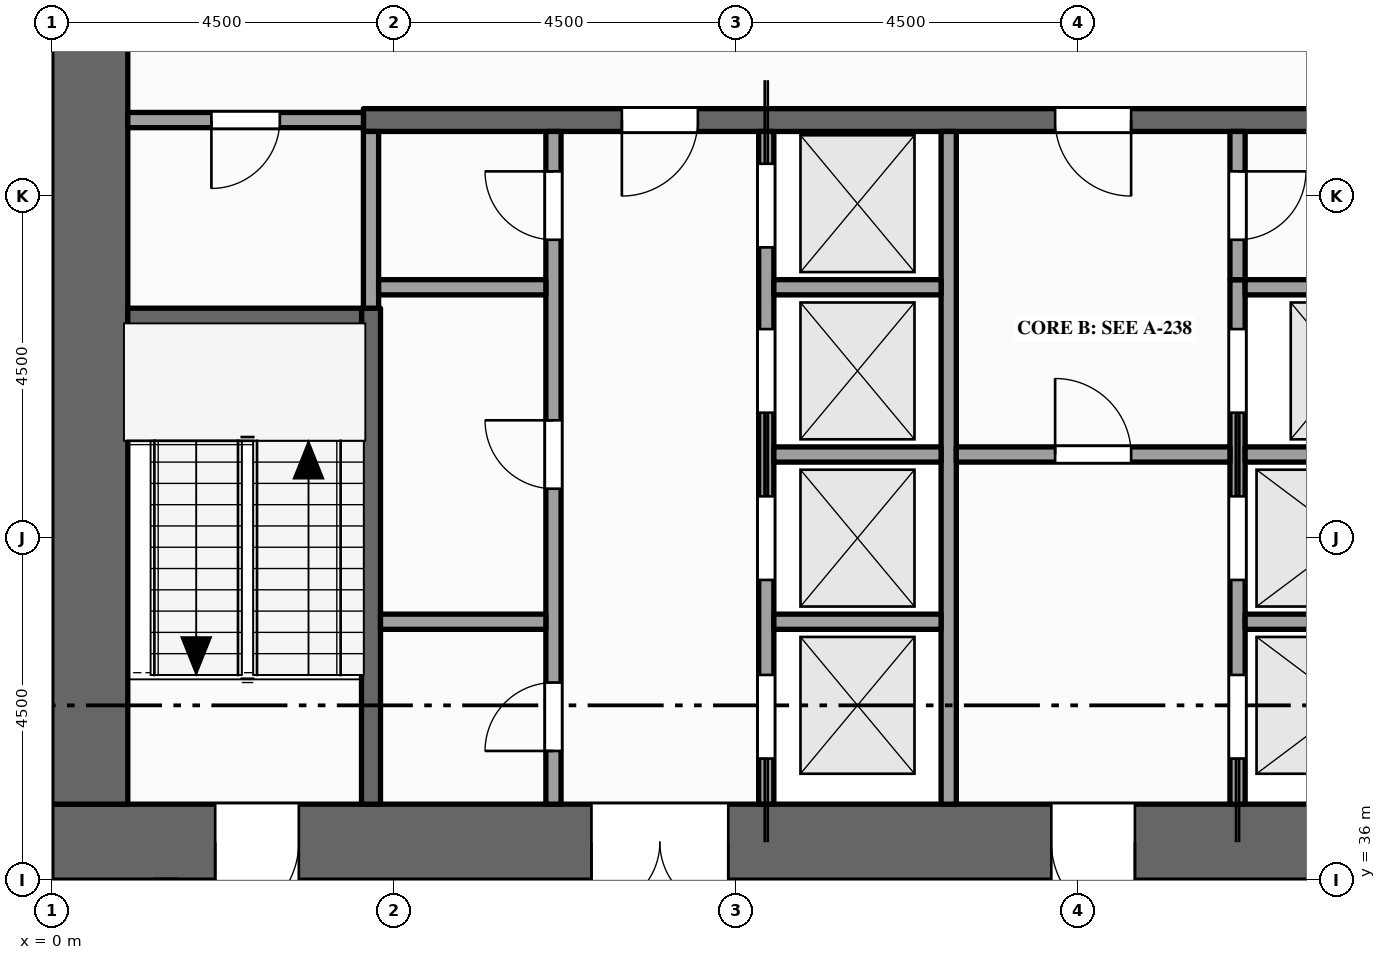
"""IFC4 building model, lengths in metres.
Left out: names, types, materials, properties, quantities, classifications, styles, units other than length and angle.
Written with IfcOpenShell. Run it as: python <this file> out.ifc"""

import sys

from ifc_helpers import new_model, si_unit, direction, frame, frame_2d, origin, place, context, subcontext, project, spatial, rectangle, extrude, element, fill, save


model = new_model("IFC4")
c1 = context("Model", 3, precision=1e-05, world=origin(), true_north=direction((0.0, 1.0)))
c2 = subcontext(c1, "Body", "Model", "MODEL_VIEW")
j1 = project(units=[si_unit("LENGTHUNIT", "METRE"), si_unit("PLANEANGLEUNIT", "RADIAN")], contexts=[c1])
p1 = place(None, origin())
s1 = spatial("IfcSite", under=j1, at=p1, CompositionType="ELEMENT")
p2 = place(p1, origin())
s2 = spatial("IfcBuilding", under=s1, at=p2, CompositionType="ELEMENT")
p3 = place(p2, frame((0.0, 0.0, 211.0)))
s3 = spatial("IfcBuildingStorey", under=s2, at=p3, CompositionType="ELEMENT", Elevation=211.0)
p4 = place(p3, frame((0.0, 36.5, -0.15), z_axis=(0.0, 0.0, 1.0), x_axis=(1.0, 0.0, 0.0)))
e1 = element("IfcWall", 1, at=p4, inside=s3, PredefinedType="SHEAR", context=c2, shape_type="SweptSolid", body=[
    extrude(rectangle(XDim=22.5, YDim=1.0, at=frame_2d((11.25, 0.0))), origin(), (0.0, 0.0, 1.0), 4.0),
])
p5 = place(p4, frame((7.1, 0.0, 0.15)))
e2 = element("IfcOpeningElement", 2, at=p5, cuts=e1, PredefinedType="OPENING", context=c2, shape_type="SweptSolid", body=[
    extrude(rectangle(XDim=1.8, YDim=2.1, at=frame_2d((0.9, 1.05))), frame((0.0, 0.51, 0.0), z_axis=(0.0, -1.0, 0.0), x_axis=(1.0, 0.0, 0.0)), (0.0, 0.0, 1.0), 1.02),
])
p6 = place(p4, frame((13.15, 0.0, 0.15)))
e3 = element("IfcOpeningElement", 3, at=p6, cuts=e1, PredefinedType="OPENING", context=c2, shape_type="SweptSolid", body=[
    extrude(rectangle(XDim=1.1, YDim=2.1, at=frame_2d((0.55, 1.05))), frame((0.0, 0.51, 0.0), z_axis=(0.0, -1.0, 0.0), x_axis=(1.0, 0.0, 0.0)), (0.0, 0.0, 1.0), 1.02),
])
p7 = place(p4, frame((2.15, 0.0, 0.15)))
e4 = element("IfcOpeningElement", 4, at=p7, cuts=e1, PredefinedType="OPENING", context=c2, shape_type="SweptSolid", body=[
    extrude(rectangle(XDim=1.1, YDim=2.1, at=frame_2d((0.55, 1.05))), frame((0.0, 0.51, 0.0), z_axis=(0.0, -1.0, 0.0), x_axis=(1.0, 0.0, 0.0)), (0.0, 0.0, 1.0), 1.02),
])
p8 = place(p4, frame((19.35, 0.0, 0.15)))
e5 = element("IfcOpeningElement", 5, at=p8, cuts=e1, PredefinedType="OPENING", context=c2, shape_type="SweptSolid", body=[
    extrude(rectangle(XDim=1.1, YDim=2.1, at=frame_2d((0.55, 1.05))), frame((0.0, 0.51, 0.0), z_axis=(0.0, -1.0, 0.0), x_axis=(1.0, 0.0, 0.0)), (0.0, 0.0, 1.0), 1.02),
])
p9 = place(p3, frame((0.5, 37.0, -0.15), z_axis=(0.0, 0.0, 1.0), x_axis=(0.0, 1.0, 0.0)))
e6 = element("IfcWall", 6, at=p9, inside=s3, PredefinedType="SHEAR", context=c2, shape_type="SweptSolid", body=[
    extrude(rectangle(XDim=11.5, YDim=1.0, at=frame_2d((5.75, 0.0))), origin(), (0.0, 0.0, 1.0), 4.0),
])
p10 = place(p3, frame((4.2, 37.0, 0.0), z_axis=(0.0, 0.0, 1.0), x_axis=(0.0, 1.0, 0.0)))
e7 = element("IfcWall", 7, at=p10, inside=s3, PredefinedType="SHEAR", context=c2, shape_type="SweptSolid", body=[
    extrude(rectangle(XDim=6.525, YDim=0.25, at=frame_2d((3.262, 0.0))), origin(), (0.0, 0.0, 1.0), 3.85),
])
p11 = place(p3, frame((4.2, 43.525, 0.0), z_axis=(0.0, 0.0, 1.0), x_axis=(0.0, 1.0, 0.0)))
e8 = element("IfcWall", 8, at=p11, inside=s3, PredefinedType="PARTITIONING", context=c2, shape_type="SweptSolid", body=[
    extrude(rectangle(XDim=2.325, YDim=0.2, at=frame_2d((1.163, 0.0))), origin(), (0.0, 0.0, 1.0), 3.85),
])
p12 = place(p3, frame((6.6, 37.0, 0.0), z_axis=(0.0, 0.0, 1.0), x_axis=(0.0, 1.0, 0.0)))
e9 = element("IfcWall", 9, at=p12, inside=s3, PredefinedType="PARTITIONING", context=c2, shape_type="SweptSolid", body=[
    extrude(rectangle(XDim=8.85, YDim=0.2, at=frame_2d((4.425, 0.0))), origin(), (0.0, 0.0, 1.0), 3.85),
])
p13 = place(p12, frame((0.7, 0.0, 0.0)))
e10 = element("IfcOpeningElement", 10, at=p13, cuts=e9, PredefinedType="OPENING", context=c2, shape_type="SweptSolid", body=[
    extrude(rectangle(XDim=0.9, YDim=2.1, at=frame_2d((0.45, 1.05))), frame((0.0, 0.11, 0.0), z_axis=(0.0, -1.0, 0.0), x_axis=(1.0, 0.0, 0.0)), (0.0, 0.0, 1.0), 0.22),
])
p14 = place(p12, frame((4.15, 0.0, 0.0)))
e11 = element("IfcOpeningElement", 11, at=p14, cuts=e9, PredefinedType="OPENING", context=c2, shape_type="SweptSolid", body=[
    extrude(rectangle(XDim=0.9, YDim=2.1, at=frame_2d((0.45, 1.05))), frame((0.0, 0.11, 0.0), z_axis=(0.0, -1.0, 0.0), x_axis=(1.0, 0.0, 0.0)), (0.0, 0.0, 1.0), 0.22),
])
p15 = place(p12, frame((7.425, 0.0, 0.0)))
e12 = element("IfcOpeningElement", 12, at=p15, cuts=e9, PredefinedType="OPENING", context=c2, shape_type="SweptSolid", body=[
    extrude(rectangle(XDim=0.9, YDim=2.1, at=frame_2d((0.45, 1.05))), frame((0.0, 0.11, 0.0), z_axis=(0.0, -1.0, 0.0), x_axis=(1.0, 0.0, 0.0)), (0.0, 0.0, 1.0), 0.22),
])
p16 = place(p3, frame((9.4, 37.0, 0.0), z_axis=(0.0, 0.0, 1.0), x_axis=(0.0, 1.0, 0.0)))
e13 = element("IfcWall", 13, at=p16, inside=s3, PredefinedType="SOLIDWALL", context=c2, shape_type="SweptSolid", body=[
    extrude(rectangle(XDim=8.85, YDim=0.2, at=frame_2d((4.425, 0.0))), origin(), (0.0, 0.0, 1.0), 3.85),
])
p17 = place(p16, frame((0.6, 0.0, 0.012)))
e14 = element("IfcOpeningElement", 14, at=p17, cuts=e13, PredefinedType="OPENING", context=c2, shape_type="SweptSolid", body=[
    extrude(rectangle(XDim=1.1, YDim=2.1, at=frame_2d((0.55, 1.05))), frame((0.0, 0.11, 0.0), z_axis=(0.0, -1.0, 0.0), x_axis=(1.0, 0.0, 0.0)), (0.0, 0.0, 1.0), 0.22),
])
p18 = place(p16, frame((2.95, 0.0, 0.012)))
e15 = element("IfcOpeningElement", 15, at=p18, cuts=e13, PredefinedType="OPENING", context=c2, shape_type="SweptSolid", body=[
    extrude(rectangle(XDim=1.1, YDim=2.1, at=frame_2d((0.55, 1.05))), frame((0.0, 0.11, 0.0), z_axis=(0.0, -1.0, 0.0), x_axis=(1.0, 0.0, 0.0)), (0.0, 0.0, 1.0), 0.22),
])
p19 = place(p16, frame((5.15, 0.0, 0.012)))
e16 = element("IfcOpeningElement", 16, at=p19, cuts=e13, PredefinedType="OPENING", context=c2, shape_type="SweptSolid", body=[
    extrude(rectangle(XDim=1.1, YDim=2.1, at=frame_2d((0.55, 1.05))), frame((0.0, 0.11, 0.0), z_axis=(0.0, -1.0, 0.0), x_axis=(1.0, 0.0, 0.0)), (0.0, 0.0, 1.0), 0.22),
])
p20 = place(p16, frame((7.325, 0.0, 0.012)))
e17 = element("IfcOpeningElement", 17, at=p20, cuts=e13, PredefinedType="OPENING", context=c2, shape_type="SweptSolid", body=[
    extrude(rectangle(XDim=1.1, YDim=2.1, at=frame_2d((0.55, 1.05))), frame((0.0, 0.11, 0.0), z_axis=(0.0, -1.0, 0.0), x_axis=(1.0, 0.0, 0.0)), (0.0, 0.0, 1.0), 0.22),
])
p21 = place(p3, frame((11.8, 37.0, 0.0), z_axis=(0.0, 0.0, 1.0), x_axis=(0.0, 1.0, 0.0)))
e18 = element("IfcWall", 18, at=p21, inside=s3, PredefinedType="SOLIDWALL", context=c2, shape_type="SweptSolid", body=[
    extrude(rectangle(XDim=8.85, YDim=0.2, at=frame_2d((4.425, 0.0))), origin(), (0.0, 0.0, 1.0), 3.85),
])
p22 = place(p3, frame((15.6, 37.0, 0.0), z_axis=(0.0, 0.0, 1.0), x_axis=(0.0, 1.0, 0.0)))
e19 = element("IfcWall", 19, at=p22, inside=s3, PredefinedType="SOLIDWALL", context=c2, shape_type="SweptSolid", body=[
    extrude(rectangle(XDim=6.9, YDim=0.2, at=frame_2d((3.45, 0.0))), origin(), (0.0, 0.0, 1.0), 3.85),
])
p23 = place(p22, frame((0.6, 0.0, 0.012)))
e20 = element("IfcOpeningElement", 20, at=p23, cuts=e19, PredefinedType="OPENING", context=c2, shape_type="SweptSolid", body=[
    extrude(rectangle(XDim=1.1, YDim=2.1, at=frame_2d((0.55, 1.05))), frame((0.0, 0.11, 0.0), z_axis=(0.0, -1.0, 0.0), x_axis=(1.0, 0.0, 0.0)), (0.0, 0.0, 1.0), 0.22),
])
p24 = place(p22, frame((2.95, 0.0, 0.012)))
e21 = element("IfcOpeningElement", 21, at=p24, cuts=e19, PredefinedType="OPENING", context=c2, shape_type="SweptSolid", body=[
    extrude(rectangle(XDim=1.1, YDim=2.1, at=frame_2d((0.55, 1.05))), frame((0.0, 0.11, 0.0), z_axis=(0.0, -1.0, 0.0), x_axis=(1.0, 0.0, 0.0)), (0.0, 0.0, 1.0), 0.22),
])
p25 = place(p22, frame((5.15, 0.0, 0.012)))
e22 = element("IfcOpeningElement", 22, at=p25, cuts=e19, PredefinedType="OPENING", context=c2, shape_type="SweptSolid", body=[
    extrude(rectangle(XDim=1.1, YDim=2.1, at=frame_2d((0.55, 1.05))), frame((0.0, 0.11, 0.0), z_axis=(0.0, -1.0, 0.0), x_axis=(1.0, 0.0, 0.0)), (0.0, 0.0, 1.0), 0.22),
])
p26 = place(p3, frame((15.6, 43.9, 0.0), z_axis=(0.0, 0.0, 1.0), x_axis=(0.0, 1.0, 0.0)))
e23 = element("IfcWall", 23, at=p26, inside=s3, PredefinedType="PARTITIONING", context=c2, shape_type="SweptSolid", body=[
    extrude(rectangle(XDim=1.95, YDim=0.2, at=frame_2d((0.975, 0.0))), origin(), (0.0, 0.0, 1.0), 3.85),
])
p27 = place(p26, frame((0.525, 0.0, 0.0)))
e24 = element("IfcOpeningElement", 24, at=p27, cuts=e23, PredefinedType="OPENING", context=c2, shape_type="SweptSolid", body=[
    extrude(rectangle(XDim=0.9, YDim=2.1, at=frame_2d((0.45, 1.05))), frame((0.0, 0.11, 0.0), z_axis=(0.0, -1.0, 0.0), x_axis=(1.0, 0.0, 0.0)), (0.0, 0.0, 1.0), 0.22),
])
p28 = place(p3, frame((4.325, 39.4, 0.0), z_axis=(0.0, 0.0, 1.0), x_axis=(1.0, 0.0, 0.0)))
e25 = element("IfcWall", 25, at=p28, inside=s3, PredefinedType="PARTITIONING", context=c2, shape_type="SweptSolid", body=[
    extrude(rectangle(XDim=2.175, YDim=0.2, at=frame_2d((1.087, 0.0))), origin(), (0.0, 0.0, 1.0), 3.85),
])
p29 = place(p3, frame((9.5, 39.4, 0.0), z_axis=(0.0, 0.0, 1.0), x_axis=(1.0, 0.0, 0.0)))
e26 = element("IfcWall", 26, at=p29, inside=s3, PredefinedType="SOLIDWALL", context=c2, shape_type="SweptSolid", body=[
    extrude(rectangle(XDim=2.2, YDim=0.2, at=frame_2d((1.1, 0.0))), origin(), (0.0, 0.0, 1.0), 3.85),
])
p30 = place(p3, frame((15.7, 39.4, 0.0), z_axis=(0.0, 0.0, 1.0), x_axis=(1.0, 0.0, 0.0)))
e27 = element("IfcWall", 27, at=p30, inside=s3, PredefinedType="SOLIDWALL", context=c2, shape_type="SweptSolid", body=[
    extrude(rectangle(XDim=2.675, YDim=0.2, at=frame_2d((1.337, 0.0))), origin(), (0.0, 0.0, 1.0), 3.85),
])
p31 = place(p3, frame((9.5, 41.6, 0.0), z_axis=(0.0, 0.0, 1.0), x_axis=(1.0, 0.0, 0.0)))
e28 = element("IfcWall", 28, at=p31, inside=s3, PredefinedType="SOLIDWALL", context=c2, shape_type="SweptSolid", body=[
    extrude(rectangle(XDim=2.2, YDim=0.2, at=frame_2d((1.1, 0.0))), origin(), (0.0, 0.0, 1.0), 3.85),
])
p32 = place(p3, frame((11.9, 41.6, 0.0), z_axis=(0.0, 0.0, 1.0), x_axis=(1.0, 0.0, 0.0)))
e29 = element("IfcWall", 29, at=p32, inside=s3, PredefinedType="PARTITIONING", context=c2, shape_type="SweptSolid", body=[
    extrude(rectangle(XDim=3.6, YDim=0.2, at=frame_2d((1.8, 0.0))), origin(), (0.0, 0.0, 1.0), 3.85),
])
p33 = place(p32, frame((1.3, 0.0, 0.0)))
e30 = element("IfcOpeningElement", 30, at=p33, cuts=e29, PredefinedType="OPENING", context=c2, shape_type="SweptSolid", body=[
    extrude(rectangle(XDim=1.0, YDim=2.1, at=frame_2d((0.5, 1.05))), frame((0.0, 0.11, 0.0), z_axis=(0.0, -1.0, 0.0), x_axis=(1.0, 0.0, 0.0)), (0.0, 0.0, 1.0), 0.22),
])
p34 = place(p3, frame((15.7, 41.6, 0.0), z_axis=(0.0, 0.0, 1.0), x_axis=(1.0, 0.0, 0.0)))
e31 = element("IfcWall", 31, at=p34, inside=s3, PredefinedType="SOLIDWALL", context=c2, shape_type="SweptSolid", body=[
    extrude(rectangle(XDim=2.675, YDim=0.2, at=frame_2d((1.337, 0.0))), origin(), (0.0, 0.0, 1.0), 3.85),
])
p35 = place(p3, frame((1.0, 43.4, 0.0), z_axis=(0.0, 0.0, 1.0), x_axis=(1.0, 0.0, 0.0)))
e32 = element("IfcWall", 32, at=p35, inside=s3, PredefinedType="SHEAR", context=c2, shape_type="SweptSolid", body=[
    extrude(rectangle(XDim=3.075, YDim=0.25, at=frame_2d((1.538, 0.0))), origin(), (0.0, 0.0, 1.0), 3.85),
])
p36 = place(p3, frame((4.3, 43.8, 0.0), z_axis=(0.0, 0.0, 1.0), x_axis=(1.0, 0.0, 0.0)))
e33 = element("IfcWall", 33, at=p36, inside=s3, PredefinedType="PARTITIONING", context=c2, shape_type="SweptSolid", body=[
    extrude(rectangle(XDim=2.2, YDim=0.2, at=frame_2d((1.1, 0.0))), origin(), (0.0, 0.0, 1.0), 3.85),
])
p37 = place(p3, frame((9.5, 43.8, 0.0), z_axis=(0.0, 0.0, 1.0), x_axis=(1.0, 0.0, 0.0)))
e34 = element("IfcWall", 34, at=p37, inside=s3, PredefinedType="SOLIDWALL", context=c2, shape_type="SweptSolid", body=[
    extrude(rectangle(XDim=2.2, YDim=0.2, at=frame_2d((1.1, 0.0))), origin(), (0.0, 0.0, 1.0), 3.85),
])
p38 = place(p3, frame((15.7, 43.8, 0.0), z_axis=(0.0, 0.0, 1.0), x_axis=(1.0, 0.0, 0.0)))
e35 = element("IfcWall", 35, at=p38, inside=s3, PredefinedType="SOLIDWALL", context=c2, shape_type="SweptSolid", body=[
    extrude(rectangle(XDim=2.7, YDim=0.2, at=frame_2d((1.35, 0.0))), origin(), (0.0, 0.0, 1.0), 3.85),
])
p39 = place(p3, frame((1.0, 46.0, 0.0), z_axis=(0.0, 0.0, 1.0), x_axis=(1.0, 0.0, 0.0)))
e36 = element("IfcWall", 36, at=p39, inside=s3, PredefinedType="PARTITIONING", context=c2, shape_type="SweptSolid", body=[
    extrude(rectangle(XDim=3.1, YDim=0.2, at=frame_2d((1.55, 0.0))), origin(), (0.0, 0.0, 1.0), 3.85),
])
p40 = place(p39, frame((1.1, 0.0, 0.0)))
e37 = element("IfcOpeningElement", 37, at=p40, cuts=e36, PredefinedType="OPENING", context=c2, shape_type="SweptSolid", body=[
    extrude(rectangle(XDim=0.9, YDim=2.1, at=frame_2d((0.45, 1.05))), frame((0.0, 0.11, 0.0), z_axis=(0.0, -1.0, 0.0), x_axis=(1.0, 0.0, 0.0)), (0.0, 0.0, 1.0), 0.22),
])
p41 = place(p3, frame((4.1, 46.0, 0.0), z_axis=(0.0, 0.0, 1.0), x_axis=(1.0, 0.0, 0.0)))
e38 = element("IfcWall", 38, at=p41, inside=s3, PredefinedType="SHEAR", context=c2, shape_type="SweptSolid", body=[
    extrude(rectangle(XDim=14.5, YDim=0.3, at=frame_2d((7.25, 0.0))), origin(), (0.0, 0.0, 1.0), 3.85),
])
p42 = place(p41, frame((3.4, 0.0, 0.0)))
e39 = element("IfcOpeningElement", 39, at=p42, cuts=e38, PredefinedType="OPENING", context=c2, shape_type="SweptSolid", body=[
    extrude(rectangle(XDim=1.0, YDim=2.1, at=frame_2d((0.5, 1.05))), frame((0.0, 0.16, 0.0), z_axis=(0.0, -1.0, 0.0), x_axis=(1.0, 0.0, 0.0)), (0.0, 0.0, 1.0), 0.32),
])
p43 = place(p41, frame((9.1, 0.0, 0.0)))
e40 = element("IfcOpeningElement", 40, at=p43, cuts=e38, PredefinedType="OPENING", context=c2, shape_type="SweptSolid", body=[
    extrude(rectangle(XDim=1.0, YDim=2.1, at=frame_2d((0.5, 1.05))), frame((0.0, 0.16, 0.0), z_axis=(0.0, -1.0, 0.0), x_axis=(1.0, 0.0, 0.0)), (0.0, 0.0, 1.0), 0.32),
])
p44 = place(p17, origin())
e41 = element("IfcDoor", 41, at=p44, inside=s3, OperationType="SLIDING_TO_LEFT", PredefinedType="DOOR", context=c2, shape_type="SweptSolid", body=[
    extrude(rectangle(XDim=1.1, YDim=2.1, at=frame_2d((0.55, 1.05))), frame((0.0, 0.025, 0.0), z_axis=(0.0, -1.0, 0.0), x_axis=(1.0, 0.0, 0.0)), (0.0, 0.0, 1.0), 0.05),
])
fill(e14, e41)
p45 = place(p18, origin())
e42 = element("IfcDoor", 42, at=p45, inside=s3, OperationType="SLIDING_TO_RIGHT", PredefinedType="DOOR", context=c2, shape_type="SweptSolid", body=[
    extrude(rectangle(XDim=1.1, YDim=2.1, at=frame_2d((0.55, 1.05))), frame((0.0, 0.025, 0.0), z_axis=(0.0, -1.0, 0.0), x_axis=(1.0, 0.0, 0.0)), (0.0, 0.0, 1.0), 0.05),
])
fill(e15, e42)
p46 = place(p19, origin())
e43 = element("IfcDoor", 43, at=p46, inside=s3, OperationType="SLIDING_TO_LEFT", PredefinedType="DOOR", context=c2, shape_type="SweptSolid", body=[
    extrude(rectangle(XDim=1.1, YDim=2.1, at=frame_2d((0.55, 1.05))), frame((0.0, 0.025, 0.0), z_axis=(0.0, -1.0, 0.0), x_axis=(1.0, 0.0, 0.0)), (0.0, 0.0, 1.0), 0.05),
])
fill(e16, e43)
p47 = place(p20, origin())
e44 = element("IfcDoor", 44, at=p47, inside=s3, OperationType="SLIDING_TO_RIGHT", PredefinedType="DOOR", context=c2, shape_type="SweptSolid", body=[
    extrude(rectangle(XDim=1.1, YDim=2.1, at=frame_2d((0.55, 1.05))), frame((0.0, 0.025, 0.0), z_axis=(0.0, -1.0, 0.0), x_axis=(1.0, 0.0, 0.0)), (0.0, 0.0, 1.0), 0.05),
])
fill(e17, e44)
p48 = place(p23, origin())
e45 = element("IfcDoor", 45, at=p48, inside=s3, OperationType="SLIDING_TO_LEFT", PredefinedType="DOOR", context=c2, shape_type="SweptSolid", body=[
    extrude(rectangle(XDim=1.1, YDim=2.1, at=frame_2d((0.55, 1.05))), frame((0.0, 0.025, 0.0), z_axis=(0.0, -1.0, 0.0), x_axis=(1.0, 0.0, 0.0)), (0.0, 0.0, 1.0), 0.05),
])
fill(e20, e45)
p49 = place(p24, origin())
e46 = element("IfcDoor", 46, at=p49, inside=s3, OperationType="SLIDING_TO_RIGHT", PredefinedType="DOOR", context=c2, shape_type="SweptSolid", body=[
    extrude(rectangle(XDim=1.1, YDim=2.1, at=frame_2d((0.55, 1.05))), frame((0.0, 0.025, 0.0), z_axis=(0.0, -1.0, 0.0), x_axis=(1.0, 0.0, 0.0)), (0.0, 0.0, 1.0), 0.05),
])
fill(e21, e46)
p50 = place(p25, origin())
e47 = element("IfcDoor", 47, at=p50, inside=s3, OperationType="SLIDING_TO_LEFT", PredefinedType="DOOR", context=c2, shape_type="SweptSolid", body=[
    extrude(rectangle(XDim=1.1, YDim=2.1, at=frame_2d((0.55, 1.05))), frame((0.0, 0.025, 0.0), z_axis=(0.0, -1.0, 0.0), x_axis=(1.0, 0.0, 0.0)), (0.0, 0.0, 1.0), 0.05),
])
fill(e22, e47)
p51 = place(p5, origin())
e48 = element("IfcDoor", 48, at=p51, inside=s3, OperationType="DOUBLE_DOOR_SINGLE_SWING", PredefinedType="DOOR", context=c2, shape_type="SweptSolid", body=[
    extrude(rectangle(XDim=1.8, YDim=2.1, at=frame_2d((0.9, 1.05))), frame((0.0, 0.025, 0.0), z_axis=(0.0, -1.0, 0.0), x_axis=(1.0, 0.0, 0.0)), (0.0, 0.0, 1.0), 0.05),
])
fill(e2, e48)
p52 = place(p42, origin())
e49 = element("IfcDoor", 49, at=p52, inside=s3, OperationType="SINGLE_SWING_LEFT", PredefinedType="DOOR", context=c2, shape_type="SweptSolid", body=[
    extrude(rectangle(XDim=1.0, YDim=2.1, at=frame_2d((0.5, 1.05))), frame((0.0, 0.025, 0.0), z_axis=(0.0, -1.0, 0.0), x_axis=(1.0, 0.0, 0.0)), (0.0, 0.0, 1.0), 0.05),
])
fill(e39, e49)
p53 = place(p6, origin())
e50 = element("IfcDoor", 50, at=p53, inside=s3, OperationType="SINGLE_SWING_RIGHT", PredefinedType="DOOR", context=c2, shape_type="SweptSolid", body=[
    extrude(rectangle(XDim=1.1, YDim=2.1, at=frame_2d((0.55, 1.05))), frame((0.0, 0.025, 0.0), z_axis=(0.0, -1.0, 0.0), x_axis=(1.0, 0.0, 0.0)), (0.0, 0.0, 1.0), 0.05),
])
fill(e3, e50)
p54 = place(p33, origin())
e51 = element("IfcDoor", 51, at=p54, inside=s3, OperationType="SINGLE_SWING_LEFT", PredefinedType="DOOR", context=c2, shape_type="SweptSolid", body=[
    extrude(rectangle(XDim=1.0, YDim=2.1, at=frame_2d((0.5, 1.05))), frame((0.0, 0.025, 0.0), z_axis=(0.0, -1.0, 0.0), x_axis=(1.0, 0.0, 0.0)), (0.0, 0.0, 1.0), 0.05),
])
fill(e30, e51)
p55 = place(p43, origin())
e52 = element("IfcDoor", 52, at=p55, inside=s3, OperationType="SINGLE_SWING_RIGHT", PredefinedType="DOOR", context=c2, shape_type="SweptSolid", body=[
    extrude(rectangle(XDim=1.0, YDim=2.1, at=frame_2d((0.5, 1.05))), frame((0.0, 0.025, 0.0), z_axis=(0.0, -1.0, 0.0), x_axis=(1.0, 0.0, 0.0)), (0.0, 0.0, 1.0), 0.05),
])
fill(e40, e52)
p56 = place(p7, origin())
e53 = element("IfcDoor", 53, at=p56, inside=s3, OperationType="SINGLE_SWING_LEFT", PredefinedType="DOOR", context=c2, shape_type="SweptSolid", body=[
    extrude(rectangle(XDim=1.1, YDim=2.1, at=frame_2d((0.55, 1.05))), frame((0.0, 0.025, 0.0), z_axis=(0.0, -1.0, 0.0), x_axis=(1.0, 0.0, 0.0)), (0.0, 0.0, 1.0), 0.05),
])
fill(e4, e53)
p57 = place(p40, origin())
e54 = element("IfcDoor", 54, at=p57, inside=s3, OperationType="SINGLE_SWING_LEFT", PredefinedType="DOOR", context=c2, shape_type="SweptSolid", body=[
    extrude(rectangle(XDim=0.9, YDim=2.1, at=frame_2d((0.45, 1.05))), frame((0.0, 0.025, 0.0), z_axis=(0.0, -1.0, 0.0), x_axis=(1.0, 0.0, 0.0)), (0.0, 0.0, 1.0), 0.05),
])
fill(e37, e54)
p58 = place(p13, origin())
e55 = element("IfcDoor", 55, at=p58, inside=s3, OperationType="SINGLE_SWING_LEFT", PredefinedType="DOOR", context=c2, shape_type="SweptSolid", body=[
    extrude(rectangle(XDim=0.9, YDim=2.1, at=frame_2d((0.45, 1.05))), frame((0.0, 0.025, 0.0), z_axis=(0.0, -1.0, 0.0), x_axis=(1.0, 0.0, 0.0)), (0.0, 0.0, 1.0), 0.05),
])
fill(e10, e55)
p59 = place(p14, origin())
e56 = element("IfcDoor", 56, at=p59, inside=s3, OperationType="SINGLE_SWING_RIGHT", PredefinedType="DOOR", context=c2, shape_type="SweptSolid", body=[
    extrude(rectangle(XDim=0.9, YDim=2.1, at=frame_2d((0.45, 1.05))), frame((0.0, 0.025, 0.0), z_axis=(0.0, -1.0, 0.0), x_axis=(1.0, 0.0, 0.0)), (0.0, 0.0, 1.0), 0.05),
])
fill(e11, e56)
p60 = place(p15, origin())
e57 = element("IfcDoor", 57, at=p60, inside=s3, OperationType="SINGLE_SWING_RIGHT", PredefinedType="DOOR", context=c2, shape_type="SweptSolid", body=[
    extrude(rectangle(XDim=0.9, YDim=2.1, at=frame_2d((0.45, 1.05))), frame((0.0, 0.025, 0.0), z_axis=(0.0, -1.0, 0.0), x_axis=(1.0, 0.0, 0.0)), (0.0, 0.0, 1.0), 0.05),
])
fill(e12, e57)
p61 = place(p27, origin())
e58 = element("IfcDoor", 58, at=p61, inside=s3, OperationType="SINGLE_SWING_RIGHT", PredefinedType="DOOR", context=c2, shape_type="SweptSolid", body=[
    extrude(rectangle(XDim=0.9, YDim=2.1, at=frame_2d((0.45, 1.05))), frame((0.0, 0.025, 0.0), z_axis=(0.0, -1.0, 0.0), x_axis=(1.0, 0.0, 0.0)), (0.0, 0.0, 1.0), 0.05),
])
fill(e24, e58)
save(model, sys.argv[1])
